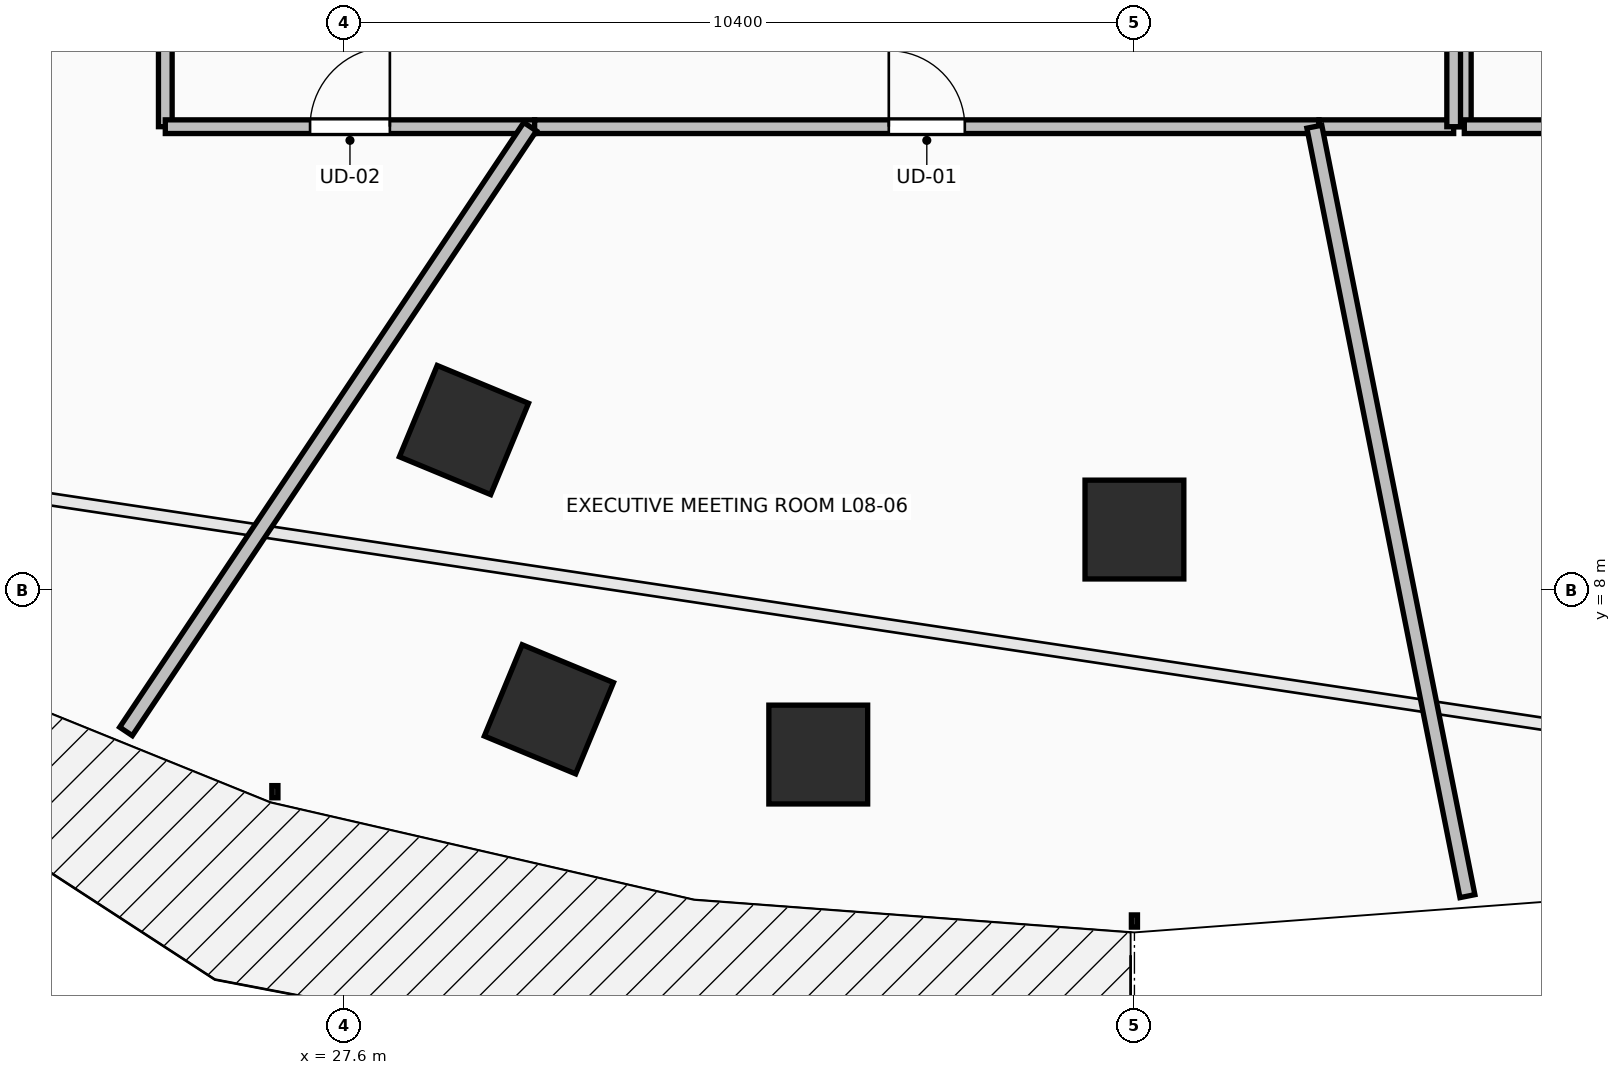
"""IFC4 building model, lengths in metres.
Left out: names, types, materials, properties, quantities, classifications, styles, units other than length and angle.
Written with IfcOpenShell. Run it as: python <this file> out.ifc"""

import sys

from ifc_helpers import new_model, si_unit, direction, frame, frame_2d, origin, origin_2d, place, context, subcontext, project, spatial, rectangle, extrude, element, fill, save


model = new_model("IFC4")
c1 = context("Model", 3, precision=1e-05, world=origin(), true_north=direction((0.0, 1.0)))
c2 = subcontext(c1, "Body", "Model", "MODEL_VIEW")
j1 = project(units=[si_unit("LENGTHUNIT", "METRE"), si_unit("PLANEANGLEUNIT", "RADIAN")], contexts=[c1])
p1 = place(None, origin())
s1 = spatial("IfcSite", under=j1, at=p1, CompositionType="ELEMENT")
p2 = place(p1, origin())
s2 = spatial("IfcBuilding", under=s1, at=p2, CompositionType="ELEMENT")
p3 = place(p2, frame((0.0, 0.0, 34.5)))
s3 = spatial("IfcBuildingStorey", under=s2, at=p3, CompositionType="ELEMENT", Elevation=34.5)
for number, where, z_axis, x_axis in (
    (1, (29.179, 10.109, 0.0), (0.0, 0.0, 1.0), (-0.383, -0.924, 0.0)),
    (2, (38.0, 8.8, 0.0), (0.0, 0.0, 1.0), (0.0, -1.0, 0.0)),
    (3, (30.297, 6.435, 0.0), (0.0, 0.0, 1.0), (-0.383, -0.924, 0.0)),
    (4, (33.84, 5.84, 0.0), (0.0, 0.0, 1.0), (0.0, -1.0, 0.0)),
):
    element("IfcColumn", number, at=place(p3, frame(where, z_axis=z_axis, x_axis=x_axis)), inside=s3, PredefinedType="COLUMN", context=c2, shape_type="SweptSolid", body=[
        extrude(rectangle(XDim=1.3, YDim=1.3, at=origin_2d()), origin(), (0.0, 0.0, 1.0), 3.5),
    ])
p4 = place(p3, frame((25.25, 18.384, 0.0), z_axis=(0.0, 0.0, 1.0), x_axis=(0.0, -1.0, 0.0)))
e5 = element("IfcWall", 5, at=p4, inside=s3, PredefinedType="PARTITIONING", context=c2, shape_type="SweptSolid", body=[
    extrude(rectangle(XDim=4.284, YDim=0.18, at=frame_2d((2.142, 0.0))), origin(), (0.0, 0.0, 1.0), 2.432),
])
p5 = place(p3, frame((25.25, 14.1, 0.0), z_axis=(0.0, 0.0, 1.0), x_axis=(1.0, 0.0, 0.0)))
e6 = element("IfcWall", 6, at=p5, inside=s3, PredefinedType="PARTITIONING", context=c2, shape_type="SweptSolid", body=[
    extrude(rectangle(XDim=4.859, YDim=0.18, at=frame_2d((2.429, 0.0))), origin(), (0.0, 0.0, 1.0), 2.432),
])
p6 = place(p5, frame((1.905, 0.0, 0.0)))
e7 = element("IfcOpeningElement", 7, at=p6, cuts=e6, PredefinedType="OPENING", context=c2, shape_type="SweptSolid", body=[
    extrude(rectangle(XDim=1.05, YDim=2.2, at=frame_2d((0.525, 1.1))), frame((0.0, 0.105, 0.0), z_axis=(0.0, -1.0, 0.0), x_axis=(1.0, 0.0, 0.0)), (0.0, 0.0, 1.0), 0.21),
])
p7 = place(p3, frame((30.109, 14.1, 0.0), z_axis=(0.0, 0.0, 1.0), x_axis=(1.0, 0.0, 0.0)))
e8 = element("IfcWall", 8, at=p7, inside=s3, PredefinedType="PARTITIONING", context=c2, shape_type="SweptSolid", body=[
    extrude(rectangle(XDim=10.319, YDim=0.18, at=frame_2d((5.16, 0.0))), origin(), (0.0, 0.0, 1.0), 3.24),
])
p8 = place(p7, frame((4.659, 0.0, 0.0)))
e9 = element("IfcOpeningElement", 9, at=p8, cuts=e8, PredefinedType="OPENING", context=c2, shape_type="SweptSolid", body=[
    extrude(rectangle(XDim=1.0, YDim=2.15, at=frame_2d((0.5, 1.075))), frame((0.0, 0.105, 0.0), z_axis=(0.0, -1.0, 0.0), x_axis=(1.0, 0.0, 0.0)), (0.0, 0.0, 1.0), 0.21),
])
p9 = place(p3, frame((42.34, 16.24, 0.0), z_axis=(0.0, 0.0, 1.0), x_axis=(0.0, -1.0, 0.0)))
e10 = element("IfcWall", 10, at=p9, inside=s3, PredefinedType="PARTITIONING", context=c2, shape_type="SweptSolid", body=[
    extrude(rectangle(XDim=2.14, YDim=0.18, at=frame_2d((1.07, 0.0))), origin(), (0.0, 0.0, 1.0), 3.24),
])
p10 = place(p3, frame((42.34, 14.1, 0.0), z_axis=(0.0, 0.0, 1.0), x_axis=(1.0, 0.0, 0.0)))
e11 = element("IfcWall", 11, at=p10, inside=s3, PredefinedType="PARTITIONING", context=c2, shape_type="SweptSolid", body=[
    extrude(rectangle(XDim=8.41, YDim=0.18, at=frame_2d((4.205, 0.0))), origin(), (0.0, 0.0, 1.0), 2.432),
])
p11 = place(p10, frame((3.705, 0.0, 0.0)))
e12 = element("IfcOpeningElement", 12, at=p11, cuts=e11, PredefinedType="OPENING", context=c2, shape_type="SweptSolid", body=[
    extrude(rectangle(XDim=1.0, YDim=2.15, at=frame_2d((0.5, 1.075))), frame((0.0, 0.105, 0.0), z_axis=(0.0, -1.0, 0.0), x_axis=(1.0, 0.0, 0.0)), (0.0, 0.0, 1.0), 0.21),
])
p12 = place(p3, frame((40.428, 14.1, 0.0), z_axis=(0.0, 0.0, 1.0), x_axis=(1.0, 0.0, 0.0)))
e13 = element("IfcWall", 13, at=p12, inside=s3, PredefinedType="PARTITIONING", context=c2, shape_type="SweptSolid", body=[
    extrude(rectangle(XDim=1.772, YDim=0.18, at=frame_2d((0.886, 0.0))), origin(), (0.0, 0.0, 1.0), 3.24),
])
p13 = place(p3, frame((42.2, 14.1, 0.0), z_axis=(0.0, 0.0, 1.0), x_axis=(0.0, 1.0, 0.0)))
e14 = element("IfcWall", 14, at=p13, inside=s3, PredefinedType="PARTITIONING", context=c2, shape_type="SweptSolid", body=[
    extrude(rectangle(XDim=2.14, YDim=0.18, at=frame_2d((1.07, 0.0))), origin(), (0.0, 0.0, 1.0), 3.24),
])
p14 = place(p3, frame((24.733, 6.144, 0.0), z_axis=(0.0, 0.0, 1.0), x_axis=(0.555577192504, 0.831464962082, 0.0)))
e15 = element("IfcWall", 15, at=p14, inside=s3, PredefinedType="PARTITIONING", context=c2, shape_type="SweptSolid", body=[
    extrude(rectangle(XDim=9.569, YDim=0.2, at=frame_2d((4.784, 0.0))), origin(), (0.0, 0.0, 1.0), 2.432),
])
p15 = place(p3, frame((42.381, 3.977, 0.0), z_axis=(0.0, 0.0, 1.0), x_axis=(-0.195142599893, 0.980774880239, 0.0)))
e16 = element("IfcWall", 16, at=p15, inside=s3, PredefinedType="PARTITIONING", context=c2, shape_type="SweptSolid", body=[
    extrude(rectangle(XDim=10.322, YDim=0.2, at=frame_2d((5.161, 0.0))), origin(), (0.0, 0.0, 1.0), 2.432),
])
p16 = place(p6, origin())
e17 = element("IfcDoor", 17, at=p16, inside=s3, OperationType="SINGLE_SWING_RIGHT", PredefinedType="DOOR", context=c2, shape_type="SweptSolid", body=[
    extrude(rectangle(XDim=1.05, YDim=2.2, at=frame_2d((0.525, 1.1))), frame((0.0, 0.025, 0.0), z_axis=(0.0, -1.0, 0.0), x_axis=(1.0, 0.0, 0.0)), (0.0, 0.0, 1.0), 0.05),
])
fill(e7, e17)
p17 = place(p8, origin())
e18 = element("IfcDoor", 18, at=p17, inside=s3, OperationType="SINGLE_SWING_LEFT", PredefinedType="DOOR", context=c2, shape_type="SweptSolid", body=[
    extrude(rectangle(XDim=1.0, YDim=2.15, at=frame_2d((0.5, 1.075))), frame((0.0, 0.025, 0.0), z_axis=(0.0, -1.0, 0.0), x_axis=(1.0, 0.0, 0.0)), (0.0, 0.0, 1.0), 0.05),
])
fill(e9, e18)
save(model, sys.argv[1])
